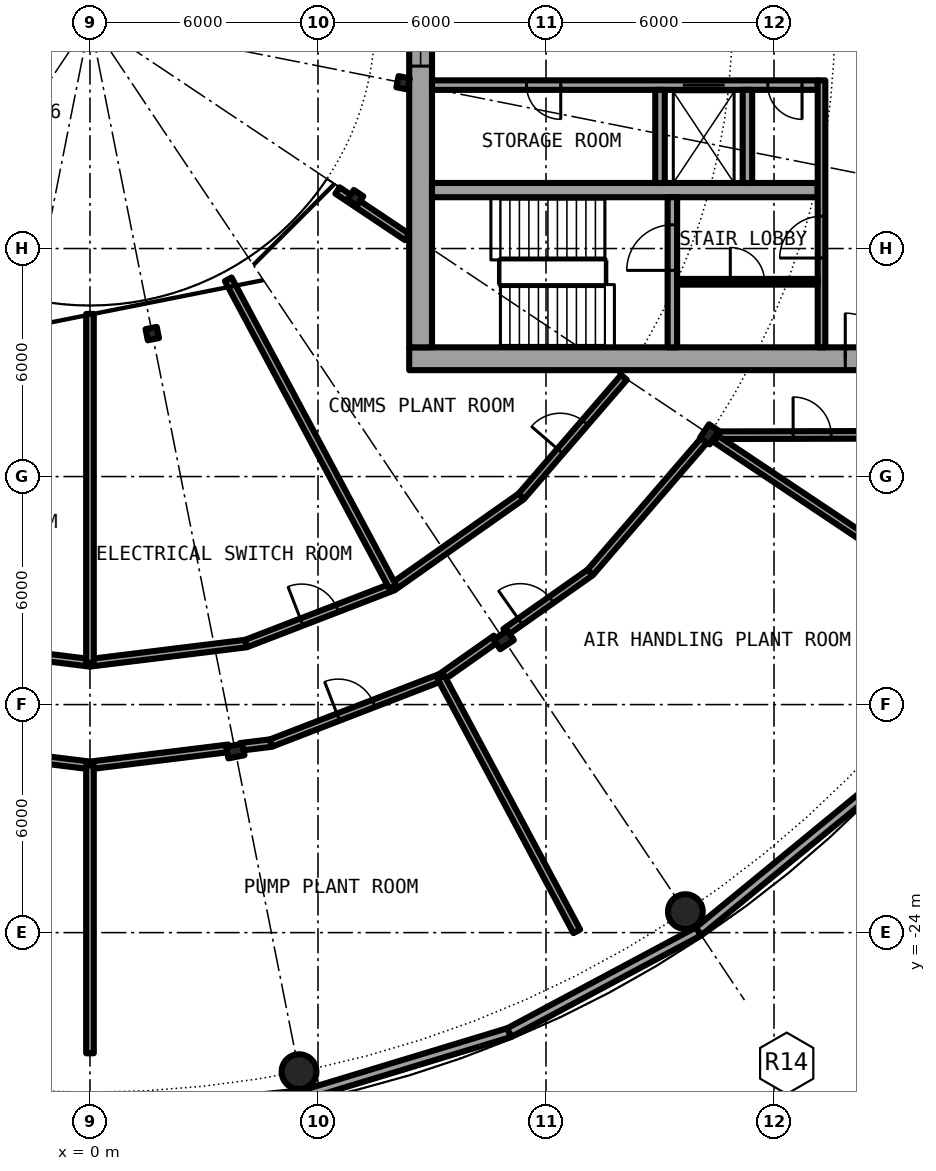
"""IFC4 building model, lengths in metres.
Left out: names, types, materials, properties, quantities, classifications, styles, units other than length and angle.
Written with IfcOpenShell. Run it as: python <this file> out.ifc"""

import sys

from ifc_helpers import new_model, si_unit, direction, frame, frame_2d, origin, origin_2d, place, context, subcontext, project, spatial, rectangle, hollow_circle, i_section, extrude, element, fill, save


model = new_model("IFC4")
c1 = context("Model", 3, precision=1e-05, world=origin(), true_north=direction((0.0, 1.0)))
c2 = subcontext(c1, "Body", "Model", "MODEL_VIEW")
j1 = project(units=[si_unit("LENGTHUNIT", "METRE"), si_unit("PLANEANGLEUNIT", "RADIAN")], contexts=[c1])
p1 = place(None, origin())
s1 = spatial("IfcSite", under=j1, at=p1, CompositionType="ELEMENT")
p2 = place(p1, origin())
s2 = spatial("IfcBuilding", under=s1, at=p2, CompositionType="ELEMENT")
p3 = place(p2, frame((0.0, 0.0, 103.25)))
s3 = spatial("IfcBuildingStorey", under=s2, at=p3, CompositionType="ELEMENT", Elevation=103.25)
for number, where, z_axis, x_axis in (
    (1, (5.501, -27.658, 0.0), (0.0, 0.0, 1.0), (1.0, 0.0, 0.0)),
    (2, (15.667, -23.448, 0.0), (0.0, 0.0, 1.0), (1.0, 0.0, 0.0)),
):
    element("IfcColumn", number, at=place(p3, frame(where, z_axis=z_axis, x_axis=x_axis)), inside=s3, PredefinedType="COLUMN", context=c2, shape_type="SweptSolid", body=[
        extrude(hollow_circle(Radius=0.457, WallThickness=0.04, at=origin_2d()), origin(), (0.0, 0.0, 1.0), 4.2),
    ])
for number, where, z_axis, x_axis in (
    (3, (3.824, -19.223, 0.0), (0.0, 0.0, 1.0), (0.195, -0.981, 0.0)),
    (4, (10.889, -16.297, 0.0), (0.0, 0.0, 1.0), (0.556, -0.831, 0.0)),
    (5, (16.297, -10.889, 0.0), (0.0, 0.0, 1.0), (0.831, -0.556, 0.0)),
):
    element("IfcColumn", number, at=place(p3, frame(where, z_axis=z_axis, x_axis=x_axis)), inside=s3, PredefinedType="COLUMN", context=c2, shape_type="SweptSolid", body=[
        extrude(i_section(OverallWidth=0.307, OverallDepth=0.432, WebThickness=0.021, FlangeThickness=0.04, FilletRadius=0.027, at=origin_2d()), origin(), (0.0, 0.0, 1.0), 4.2),
    ])
for number, where, z_axis, x_axis in (
    (6, (1.639, -8.239, 0.0), (0.0, 0.0, 1.0), (0.195, -0.981, 0.0)),
    (7, (6.984, -4.667, 0.0), (0.0, 0.0, 1.0), (0.831, -0.556, 0.0)),
    (8, (8.239, -1.639, 0.0), (0.0, 0.0, 1.0), (0.981, -0.195, 0.0)),
):
    element("IfcColumn", number, at=place(p3, frame(where, z_axis=z_axis, x_axis=x_axis)), inside=s3, PredefinedType="COLUMN", context=c2, shape_type="SweptSolid", body=[
        extrude(i_section(OverallWidth=0.3, OverallDepth=0.3, WebThickness=0.011, FlangeThickness=0.019, FilletRadius=0.027, at=origin_2d()), origin(), (0.0, 0.0, 1.0), 4.2),
    ])
for number, where, z_axis, x_axis in (
    (9, (-5.623, -28.271, 0.0), (0.0, 0.0, 1.0), (0.995, -0.098, 0.0)),
    (10, (0.0, -28.825, 0.0), (0.0, 0.0, 1.0), (0.995, 0.098, 0.0)),
):
    element("IfcWall", number, at=place(p3, frame(where, z_axis=z_axis, x_axis=x_axis)), inside=s3, PredefinedType="SOLIDWALL", context=c2, shape_type="SweptSolid", body=[
        extrude(rectangle(XDim=5.65, YDim=0.25, at=frame_2d((2.825, 0.0))), origin(), (0.0, 0.0, 1.0), 3.85),
    ])
p4 = place(p3, frame((5.623, -28.271, 0.0), z_axis=(0.0, 0.0, 1.0), x_axis=(0.956969521741, 0.29018844646, 0.0)))
e11 = element("IfcWall", 11, at=p4, inside=s3, PredefinedType="SOLIDWALL", context=c2, shape_type="SweptSolid", body=[
    extrude(rectangle(XDim=5.651, YDim=0.25, at=frame_2d((2.826, 0.0))), origin(), (0.0, 0.0, 1.0), 3.85),
])
p5 = place(p3, frame((11.031, -26.631, 0.0), z_axis=(0.0, 0.0, 1.0), x_axis=(0.881874058161, 0.471485042756, 0.0)))
e12 = element("IfcWall", 12, at=p5, inside=s3, PredefinedType="SOLIDWALL", context=c2, shape_type="SweptSolid", body=[
    extrude(rectangle(XDim=5.65, YDim=0.25, at=frame_2d((2.825, 0.0))), origin(), (0.0, 0.0, 1.0), 3.85),
])
p6 = place(p3, frame((16.014, -23.967, 0.0), z_axis=(0.0, 0.0, 1.0), x_axis=(0.773001659186, 0.634403999748, 0.0)))
e13 = element("IfcWall", 13, at=p6, inside=s3, PredefinedType="SOLIDWALL", context=c2, shape_type="SweptSolid", body=[
    extrude(rectangle(XDim=5.651, YDim=0.25, at=frame_2d((2.825, 0.0))), origin(), (0.0, 0.0, 1.0), 3.85),
])
p7 = place(p3, frame((8.4, -8.9, 0.0), z_axis=(0.0, 0.0, 1.0), x_axis=(1.0, 0.0, 0.0)))
e14 = element("IfcWall", 14, at=p7, inside=s3, PredefinedType="SHEAR", context=c2, shape_type="SweptSolid", body=[
    extrude(rectangle(XDim=13.8, YDim=0.6, at=frame_2d((6.9, 0.0))), origin(), (0.0, 0.0, 1.0), 4.2),
])
p8 = place(p7, frame((11.475, 0.0, 0.0)))
e15 = element("IfcOpeningElement", 15, at=p8, cuts=e14, PredefinedType="OPENING", context=c2, shape_type="SweptSolid", body=[
    extrude(rectangle(XDim=1.2, YDim=2.3, at=frame_2d((0.6, 1.15))), frame((0.0, 0.31, 0.0), z_axis=(0.0, -1.0, 0.0), x_axis=(1.0, 0.0, 0.0)), (0.0, 0.0, 1.0), 0.62),
])
p9 = place(p3, frame((8.7, -8.6, 0.0), z_axis=(0.0, 0.0, 1.0), x_axis=(0.0, 1.0, 0.0)))
e16 = element("IfcWall", 16, at=p9, inside=s3, PredefinedType="SHEAR", context=c2, shape_type="SweptSolid", body=[
    extrude(rectangle(XDim=17.2, YDim=0.6, at=frame_2d((8.6, 0.0))), origin(), (0.0, 0.0, 1.0), 4.2),
])
p10 = place(p9, frame((7.4, 0.0, 0.1)))
e17 = element("IfcOpeningElement", 17, at=p10, cuts=e16, PredefinedType="OPENING", context=c2, shape_type="SweptSolid", body=[
    extrude(rectangle(XDim=2.4, YDim=2.2, at=frame_2d((1.2, 1.1))), frame((0.0, 0.31, 0.0), z_axis=(0.0, -1.0, 0.0), x_axis=(1.0, 0.0, 0.0)), (0.0, 0.0, 1.0), 0.62),
])
p11 = place(p3, frame((19.15, -1.7, 0.0), z_axis=(0.0, 0.0, 1.0), x_axis=(-1.0, 0.0, 0.0)))
e18 = element("IfcWall", 18, at=p11, inside=s3, PredefinedType="SHEAR", context=c2, shape_type="SweptSolid", body=[
    extrude(rectangle(XDim=10.15, YDim=0.25, at=frame_2d((5.075, 0.0))), origin(), (0.0, 0.0, 1.0), 4.2),
])
p12 = place(p11, frame((2.45, 0.0, 0.0)))
e19 = element("IfcOpeningElement", 19, at=p12, cuts=e18, PredefinedType="OPENING", context=c2, shape_type="SweptSolid", body=[
    extrude(rectangle(XDim=1.1, YDim=2.3, at=frame_2d((0.55, 1.15))), frame((0.0, 0.135, 0.0), z_axis=(0.0, -1.0, 0.0), x_axis=(1.0, 0.0, 0.0)), (0.0, 0.0, 1.0), 0.27),
])
p13 = place(p11, frame((6.762, 0.0, 0.0)))
e20 = element("IfcOpeningElement", 20, at=p13, cuts=e18, PredefinedType="OPENING", context=c2, shape_type="SweptSolid", body=[
    extrude(rectangle(XDim=0.9, YDim=2.3, at=frame_2d((0.45, 1.15))), frame((0.0, 0.135, 0.0), z_axis=(0.0, -1.0, 0.0), x_axis=(1.0, 0.0, 0.0)), (0.0, 0.0, 1.0), 0.27),
])
p14 = place(p11, frame((0.413, 0.0, 0.0)))
e21 = element("IfcOpeningElement", 21, at=p14, cuts=e18, PredefinedType="OPENING", context=c2, shape_type="SweptSolid", body=[
    extrude(rectangle(XDim=0.9, YDim=2.3, at=frame_2d((0.45, 1.15))), frame((0.0, 0.135, 0.0), z_axis=(0.0, -1.0, 0.0), x_axis=(1.0, 0.0, 0.0)), (0.0, 0.0, 1.0), 0.27),
])
p15 = place(p3, frame((9.0, -4.462, 0.0), z_axis=(0.0, 0.0, 1.0), x_axis=(1.0, 0.0, 0.0)))
e22 = element("IfcWall", 22, at=p15, inside=s3, PredefinedType="SHEAR", context=c2, shape_type="SweptSolid", body=[
    extrude(rectangle(XDim=10.15, YDim=0.375, at=frame_2d((5.075, 0.0))), origin(), (0.0, 0.0, 1.0), 4.2),
])
p16 = place(p3, frame((15.325, -8.6, 0.0), z_axis=(0.0, 0.0, 1.0), x_axis=(0.0, 1.0, 0.0)))
e23 = element("IfcWall", 23, at=p16, inside=s3, PredefinedType="SHEAR", context=c2, shape_type="SweptSolid", body=[
    extrude(rectangle(XDim=3.95, YDim=0.25, at=frame_2d((1.975, 0.0))), origin(), (0.0, 0.0, 1.0), 4.2),
])
p17 = place(p16, frame((2.025, 0.0, 0.0)))
e24 = element("IfcOpeningElement", 24, at=p17, cuts=e23, PredefinedType="OPENING", context=c2, shape_type="SweptSolid", body=[
    extrude(rectangle(XDim=1.2, YDim=2.3, at=frame_2d((0.6, 1.15))), frame((0.0, 0.135, 0.0), z_axis=(0.0, -1.0, 0.0), x_axis=(1.0, 0.0, 0.0)), (0.0, 0.0, 1.0), 0.27),
])
for number, where, z_axis, x_axis in (
    (25, (15.0, -1.825, 0.0), (0.0, 0.0, 1.0), (0.0, -1.0, 0.0)),
    (26, (17.3, -1.825, 0.0), (0.0, 0.0, 1.0), (0.0, -1.0, 0.0)),
):
    element("IfcWall", number, at=place(p3, frame(where, z_axis=z_axis, x_axis=x_axis)), inside=s3, PredefinedType="SOLIDWALL", context=c2, shape_type="SweptSolid", body=[
        extrude(rectangle(XDim=2.45, YDim=0.25, at=frame_2d((1.225, 0.0))), origin(), (0.0, 0.0, 1.0), 3.85),
    ])
p18 = place(p3, frame((19.25, -8.6, 0.0), z_axis=(0.0, 0.0, 1.0), x_axis=(0.0, 1.0, 0.0)))
e27 = element("IfcWall", 27, at=p18, inside=s3, PredefinedType="SOLIDWALL", context=c2, shape_type="SweptSolid", body=[
    extrude(rectangle(XDim=7.025, YDim=0.2, at=frame_2d((3.513, 0.0))), origin(), (0.0, 0.0, 1.0), 3.85),
])
p19 = place(p18, frame((2.35, 0.0, 0.0)))
e28 = element("IfcOpeningElement", 28, at=p19, cuts=e27, PredefinedType="OPENING", context=c2, shape_type="SweptSolid", body=[
    extrude(rectangle(XDim=1.1, YDim=2.3, at=frame_2d((0.55, 1.15))), frame((0.0, 0.11, 0.0), z_axis=(0.0, -1.0, 0.0), x_axis=(1.0, 0.0, 0.0)), (0.0, 0.0, 1.0), 0.22),
])
p20 = place(p3, frame((15.45, -6.875, 0.0), z_axis=(0.0, 0.0, 1.0), x_axis=(1.0, 0.0, 0.0)))
e29 = element("IfcWall", 29, at=p20, inside=s3, PredefinedType="PARTITIONING", context=c2, shape_type="SweptSolid", body=[
    extrude(rectangle(XDim=3.7, YDim=0.15, at=frame_2d((1.85, 0.0))), origin(), (0.0, 0.0, 1.0), 3.85),
])
p21 = place(p20, frame((1.4, 0.0, 0.0)))
e30 = element("IfcOpeningElement", 30, at=p21, cuts=e29, PredefinedType="OPENING", context=c2, shape_type="SweptSolid", body=[
    extrude(rectangle(XDim=0.9, YDim=2.3, at=frame_2d((0.45, 1.15))), frame((0.0, 0.085, 0.0), z_axis=(0.0, -1.0, 0.0), x_axis=(1.0, 0.0, 0.0)), (0.0, 0.0, 1.0), 0.17),
])
for number, where, z_axis, x_axis in (
    (31, (-3.653, -19.15, 0.0), (0.0, 0.0, 1.0), (0.992, -0.122, 0.0)),
    (32, (0.0, -19.6, 0.0), (0.0, 0.0, 1.0), (0.992, 0.122, 0.0)),
):
    element("IfcWall", number, at=place(p3, frame(where, z_axis=z_axis, x_axis=x_axis)), inside=s3, PredefinedType="PARTITIONING", context=c2, shape_type="SweptSolid", body=[
        extrude(rectangle(XDim=3.681, YDim=0.2, at=frame_2d((1.84, 0.0))), origin(), (0.0, 0.0, 1.0), 3.54),
    ])
p22 = place(p3, frame((3.958, -19.112, 0.0), z_axis=(0.0, 0.0, 1.0), x_axis=(0.99248512894, 0.122365308943, 0.0)))
e33 = element("IfcWall", 33, at=p22, inside=s3, PredefinedType="PARTITIONING", context=c2, shape_type="SweptSolid", body=[
    extrude(rectangle(XDim=0.81, YDim=0.2, at=frame_2d((0.405, 0.0))), origin(), (0.0, 0.0, 1.0), 3.54),
])
p23 = place(p3, frame((4.762, -19.013, 0.0), z_axis=(0.0, 0.0, 1.0), x_axis=(0.932988479706, 0.359906233255, 0.0)))
e34 = element("IfcWall", 34, at=p23, inside=s3, PredefinedType="PARTITIONING", context=c2, shape_type="SweptSolid", body=[
    extrude(rectangle(XDim=4.799, YDim=0.2, at=frame_2d((2.399, 0.0))), origin(), (0.0, 0.0, 1.0), 3.54),
])
p24 = place(p23, frame((1.899, 0.0, 0.0)))
e35 = element("IfcOpeningElement", 35, at=p24, cuts=e34, PredefinedType="OPENING", context=c2, shape_type="SweptSolid", body=[
    extrude(rectangle(XDim=1.0, YDim=2.3, at=frame_2d((0.5, 1.15))), frame((0.0, 0.11, 0.0), z_axis=(0.0, -1.0, 0.0), x_axis=(1.0, 0.0, 0.0)), (0.0, 0.0, 1.0), 0.22),
])
p25 = place(p3, frame((9.239, -17.286, 0.0), z_axis=(0.0, 0.0, 1.0), x_axis=(0.817743843048, 0.575582320052, 0.0)))
e36 = element("IfcWall", 36, at=p25, inside=s3, PredefinedType="PARTITIONING", context=c2, shape_type="SweptSolid", body=[
    extrude(rectangle(XDim=1.768, YDim=0.2, at=frame_2d((0.884, 0.0))), origin(), (0.0, 0.0, 1.0), 3.54),
])
p26 = place(p3, frame((10.936, -16.091, 0.0), z_axis=(0.0, 0.0, 1.0), x_axis=(0.817645456482, 0.575722074872, 0.0)))
e37 = element("IfcWall", 37, at=p26, inside=s3, PredefinedType="PARTITIONING", context=c2, shape_type="SweptSolid", body=[
    extrude(rectangle(XDim=2.724, YDim=0.2, at=frame_2d((1.362, 0.0))), origin(), (0.0, 0.0, 1.0), 3.54),
])
p27 = place(p26, frame((0.474, 0.0, 0.0)))
e38 = element("IfcOpeningElement", 38, at=p27, cuts=e37, PredefinedType="OPENING", context=c2, shape_type="SweptSolid", body=[
    extrude(rectangle(XDim=1.0, YDim=2.3, at=frame_2d((0.5, 1.15))), frame((0.0, 0.11, 0.0), z_axis=(0.0, -1.0, 0.0), x_axis=(1.0, 0.0, 0.0)), (0.0, 0.0, 1.0), 0.22),
])
p28 = place(p3, frame((13.163, -14.523, 0.0), z_axis=(0.0, 0.0, 1.0), x_axis=(0.653087281304, 0.757282644063, 0.0)))
e39 = element("IfcWall", 39, at=p28, inside=s3, PredefinedType="PARTITIONING", context=c2, shape_type="SweptSolid", body=[
    extrude(rectangle(XDim=4.644, YDim=0.2, at=frame_2d((2.322, 0.0))), origin(), (0.0, 0.0, 1.0), 3.54),
])
for number, where, z_axis, x_axis in (
    (40, (-4.106, -16.394, 0.0), (0.0, 0.0, 1.0), (0.992, -0.122, 0.0)),
    (41, (0.0, -16.9, 0.0), (0.0, 0.0, 1.0), (0.992, 0.122, 0.0)),
):
    element("IfcWall", number, at=place(p3, frame(where, z_axis=z_axis, x_axis=x_axis)), inside=s3, PredefinedType="PARTITIONING", context=c2, shape_type="SweptSolid", body=[
        extrude(rectangle(XDim=4.137, YDim=0.2, at=frame_2d((2.068, 0.0))), origin(), (0.0, 0.0, 1.0), 3.85),
    ])
p29 = place(p3, frame((4.106, -16.394, 0.0), z_axis=(0.0, 0.0, 1.0), x_axis=(0.932943640288, 0.360022449363, 0.0)))
e42 = element("IfcWall", 42, at=p29, inside=s3, PredefinedType="PARTITIONING", context=c2, shape_type="SweptSolid", body=[
    extrude(rectangle(XDim=4.139, YDim=0.2, at=frame_2d((2.069, 0.0))), origin(), (0.0, 0.0, 1.0), 3.85),
])
p30 = place(p29, frame((1.569, 0.0, 0.0)))
e43 = element("IfcOpeningElement", 43, at=p30, cuts=e42, PredefinedType="OPENING", context=c2, shape_type="SweptSolid", body=[
    extrude(rectangle(XDim=1.0, YDim=2.3, at=frame_2d((0.5, 1.15))), frame((0.0, 0.11, 0.0), z_axis=(0.0, -1.0, 0.0), x_axis=(1.0, 0.0, 0.0)), (0.0, 0.0, 1.0), 0.22),
])
p31 = place(p3, frame((7.967, -14.904, 0.0), z_axis=(0.0, 0.0, 1.0), x_axis=(0.817567680547, 0.575832517079, 0.0)))
e44 = element("IfcWall", 44, at=p31, inside=s3, PredefinedType="PARTITIONING", context=c2, shape_type="SweptSolid", body=[
    extrude(rectangle(XDim=4.137, YDim=0.2, at=frame_2d((2.068, 0.0))), origin(), (0.0, 0.0, 1.0), 3.85),
])
p32 = place(p3, frame((11.349, -12.522, 0.0), z_axis=(0.0, 0.0, 1.0), x_axis=(0.653212695939, 0.757174467256, 0.0)))
e45 = element("IfcWall", 45, at=p32, inside=s3, PredefinedType="PARTITIONING", context=c2, shape_type="SweptSolid", body=[
    extrude(rectangle(XDim=4.138, YDim=0.2, at=frame_2d((2.069, 0.0))), origin(), (0.0, 0.0, 1.0), 3.85),
])
p33 = place(p32, frame((1.569, 0.0, 0.0)))
e46 = element("IfcOpeningElement", 46, at=p33, cuts=e45, PredefinedType="OPENING", context=c2, shape_type="SweptSolid", body=[
    extrude(rectangle(XDim=1.0, YDim=2.3, at=frame_2d((0.5, 1.15))), frame((0.0, 0.11, 0.0), z_axis=(0.0, -1.0, 0.0), x_axis=(1.0, 0.0, 0.0)), (0.0, 0.0, 1.0), 0.22),
])
p34 = place(p3, frame((16.541, -10.912, 0.0), z_axis=(0.0, 0.0, 1.0), x_axis=(0.999997173357, 0.002377662213, 0.0)))
e47 = element("IfcWall", 47, at=p34, inside=s3, PredefinedType="PARTITIONING", context=c2, shape_type="SweptSolid", body=[
    extrude(rectangle(XDim=5.134, YDim=0.2, at=frame_2d((2.567, 0.0))), origin(), (0.0, 0.0, 1.0), 3.85),
])
p35 = place(p34, frame((1.963, 0.0, 0.0)))
e48 = element("IfcOpeningElement", 48, at=p35, cuts=e47, PredefinedType="OPENING", context=c2, shape_type="SweptSolid", body=[
    extrude(rectangle(XDim=1.0, YDim=2.3, at=frame_2d((0.5, 1.15))), frame((0.0, 0.11, 0.0), z_axis=(0.0, -1.0, 0.0), x_axis=(1.0, 0.0, 0.0)), (0.0, 0.0, 1.0), 0.22),
])
p36 = place(p3, frame((6.513, -4.472, 0.0), z_axis=(0.0, 0.0, 1.0), x_axis=(0.831333375071, -0.555774072347, 0.0)))
e49 = element("IfcWall", 49, at=p36, inside=s3, PredefinedType="PARTITIONING", context=c2, shape_type="SweptSolid", body=[
    extrude(rectangle(XDim=2.203, YDim=0.2, at=frame_2d((1.101, 0.0))), origin(), (0.0, 0.0, 1.0), 3.85),
])
p37 = place(p3, frame((0.0, -27.175, 0.0), z_axis=(0.0, 0.0, 1.0), x_axis=(0.0, 1.0, 0.0)))
e50 = element("IfcWall", 50, at=p37, inside=s3, PredefinedType="PARTITIONING", context=c2, shape_type="SweptSolid", body=[
    extrude(rectangle(XDim=7.575, YDim=0.2, at=frame_2d((3.788, 0.0))), origin(), (0.0, 0.0, 1.0), 3.85),
])
p38 = place(p3, frame((0.0, -16.9, 0.0), z_axis=(0.0, 0.0, 1.0), x_axis=(0.0, 1.0, 0.0)))
e51 = element("IfcWall", 51, at=p38, inside=s3, PredefinedType="PARTITIONING", context=c2, shape_type="SweptSolid", body=[
    extrude(rectangle(XDim=9.18, YDim=0.2, at=frame_2d((4.59, 0.0))), origin(), (0.0, 0.0, 1.0), 3.85),
])
p39 = place(p3, frame((3.638, -6.809, 0.0), z_axis=(0.0, 0.0, 1.0), x_axis=(0.471460365694, -0.881887251059, 0.0)))
e52 = element("IfcWall", 52, at=p39, inside=s3, PredefinedType="PARTITIONING", context=c2, shape_type="SweptSolid", body=[
    extrude(rectangle(XDim=9.18, YDim=0.2, at=frame_2d((4.59, 0.0))), origin(), (0.0, 0.0, 1.0), 3.85),
])
p40 = place(p3, frame((9.239, -17.286, 0.0), z_axis=(0.0, 0.0, 1.0), x_axis=(0.471439510802, -0.881898399848, 0.0)))
e53 = element("IfcWall", 53, at=p40, inside=s3, PredefinedType="PARTITIONING", context=c2, shape_type="SweptSolid", body=[
    extrude(rectangle(XDim=7.575, YDim=0.2, at=frame_2d((3.787, 0.0))), origin(), (0.0, 0.0, 1.0), 3.85),
])
p41 = place(p3, frame((16.474, -11.012, 0.0), z_axis=(0.0, 0.0, 1.0), x_axis=(0.83143223768, -0.555626164023, 0.0)))
e54 = element("IfcWall", 54, at=p41, inside=s3, PredefinedType="PARTITIONING", context=c2, shape_type="SweptSolid", body=[
    extrude(rectangle(XDim=7.359, YDim=0.2, at=frame_2d((3.68, 0.0))), origin(), (0.0, 0.0, 1.0), 3.85),
])
p42 = place(p12, origin())
e55 = element("IfcDoor", 55, at=p42, inside=s3, OperationType="DOUBLE_DOOR_SLIDING", PredefinedType="DOOR", context=c2, shape_type="SweptSolid", body=[
    extrude(rectangle(XDim=1.1, YDim=2.3, at=frame_2d((0.55, 1.15))), frame((0.0, 0.025, 0.0), z_axis=(0.0, -1.0, 0.0), x_axis=(1.0, 0.0, 0.0)), (0.0, 0.0, 1.0), 0.05),
])
fill(e19, e55)
p43 = place(p13, origin())
e56 = element("IfcDoor", 56, at=p43, inside=s3, OperationType="SINGLE_SWING_LEFT", PredefinedType="DOOR", context=c2, shape_type="SweptSolid", body=[
    extrude(rectangle(XDim=0.9, YDim=2.3, at=frame_2d((0.45, 1.15))), frame((0.0, 0.025, 0.0), z_axis=(0.0, -1.0, 0.0), x_axis=(1.0, 0.0, 0.0)), (0.0, 0.0, 1.0), 0.05),
])
fill(e20, e56)
p44 = place(p14, origin())
e57 = element("IfcDoor", 57, at=p44, inside=s3, OperationType="SINGLE_SWING_RIGHT", PredefinedType="DOOR", context=c2, shape_type="SweptSolid", body=[
    extrude(rectangle(XDim=0.9, YDim=2.3, at=frame_2d((0.45, 1.15))), frame((0.0, 0.025, 0.0), z_axis=(0.0, -1.0, 0.0), x_axis=(1.0, 0.0, 0.0)), (0.0, 0.0, 1.0), 0.05),
])
fill(e21, e57)
p45 = place(p21, origin())
e58 = element("IfcDoor", 58, at=p45, inside=s3, OperationType="SINGLE_SWING_LEFT", PredefinedType="DOOR", context=c2, shape_type="SweptSolid", body=[
    extrude(rectangle(XDim=0.9, YDim=2.3, at=frame_2d((0.45, 1.15))), frame((0.0, 0.025, 0.0), z_axis=(0.0, -1.0, 0.0), x_axis=(1.0, 0.0, 0.0)), (0.0, 0.0, 1.0), 0.05),
])
fill(e30, e58)
p46 = place(p17, origin())
e59 = element("IfcDoor", 59, at=p46, inside=s3, OperationType="SINGLE_SWING_LEFT", PredefinedType="DOOR", context=c2, shape_type="SweptSolid", body=[
    extrude(rectangle(XDim=1.2, YDim=2.3, at=frame_2d((0.6, 1.15))), frame((0.0, 0.025, 0.0), z_axis=(0.0, -1.0, 0.0), x_axis=(1.0, 0.0, 0.0)), (0.0, 0.0, 1.0), 0.05),
])
fill(e24, e59)
p47 = place(p19, origin())
e60 = element("IfcDoor", 60, at=p47, inside=s3, OperationType="SINGLE_SWING_RIGHT", PredefinedType="DOOR", context=c2, shape_type="SweptSolid", body=[
    extrude(rectangle(XDim=1.1, YDim=2.3, at=frame_2d((0.55, 1.15))), frame((0.0, 0.025, 0.0), z_axis=(0.0, -1.0, 0.0), x_axis=(1.0, 0.0, 0.0)), (0.0, 0.0, 1.0), 0.05),
])
fill(e28, e60)
p48 = place(p8, origin())
e61 = element("IfcDoor", 61, at=p48, inside=s3, OperationType="SINGLE_SWING_LEFT", PredefinedType="DOOR", context=c2, shape_type="SweptSolid", body=[
    extrude(rectangle(XDim=1.2, YDim=2.3, at=frame_2d((0.6, 1.15))), frame((0.0, 0.025, 0.0), z_axis=(0.0, -1.0, 0.0), x_axis=(1.0, 0.0, 0.0)), (0.0, 0.0, 1.0), 0.05),
])
fill(e15, e61)
p49 = place(p10, origin())
e62 = element("IfcWindow", 62, at=p49, inside=s3, PartitioningType="SINGLE_PANEL", PredefinedType="WINDOW", context=c2, shape_type="SweptSolid", body=[
    extrude(rectangle(XDim=2.4, YDim=2.2, at=frame_2d((1.2, 1.1))), frame((0.0, 0.03, 0.0), z_axis=(0.0, -1.0, 0.0), x_axis=(1.0, 0.0, 0.0)), (0.0, 0.0, 1.0), 0.06),
])
fill(e17, e62)
p50 = place(p24, origin())
e63 = element("IfcDoor", 63, at=p50, inside=s3, OperationType="SINGLE_SWING_LEFT", PredefinedType="DOOR", context=c2, shape_type="SweptSolid", body=[
    extrude(rectangle(XDim=1.0, YDim=2.3, at=frame_2d((0.5, 1.15))), frame((0.0, 0.025, 0.0), z_axis=(0.0, -1.0, 0.0), x_axis=(1.0, 0.0, 0.0)), (0.0, 0.0, 1.0), 0.05),
])
fill(e35, e63)
p51 = place(p27, origin())
e64 = element("IfcDoor", 64, at=p51, inside=s3, OperationType="SINGLE_SWING_LEFT", PredefinedType="DOOR", context=c2, shape_type="SweptSolid", body=[
    extrude(rectangle(XDim=1.0, YDim=2.3, at=frame_2d((0.5, 1.15))), frame((0.0, 0.025, 0.0), z_axis=(0.0, -1.0, 0.0), x_axis=(1.0, 0.0, 0.0)), (0.0, 0.0, 1.0), 0.05),
])
fill(e38, e64)
p52 = place(p30, origin())
e65 = element("IfcDoor", 65, at=p52, inside=s3, OperationType="SINGLE_SWING_RIGHT", PredefinedType="DOOR", context=c2, shape_type="SweptSolid", body=[
    extrude(rectangle(XDim=1.0, YDim=2.3, at=frame_2d((0.5, 1.15))), frame((0.0, 0.025, 0.0), z_axis=(0.0, -1.0, 0.0), x_axis=(1.0, 0.0, 0.0)), (0.0, 0.0, 1.0), 0.05),
])
fill(e43, e65)
p53 = place(p33, origin())
e66 = element("IfcDoor", 66, at=p53, inside=s3, OperationType="SINGLE_SWING_RIGHT", PredefinedType="DOOR", context=c2, shape_type="SweptSolid", body=[
    extrude(rectangle(XDim=1.0, YDim=2.3, at=frame_2d((0.5, 1.15))), frame((0.0, 0.025, 0.0), z_axis=(0.0, -1.0, 0.0), x_axis=(1.0, 0.0, 0.0)), (0.0, 0.0, 1.0), 0.05),
])
fill(e46, e66)
p54 = place(p35, origin())
e67 = element("IfcDoor", 67, at=p54, inside=s3, OperationType="SINGLE_SWING_LEFT", PredefinedType="DOOR", context=c2, shape_type="SweptSolid", body=[
    extrude(rectangle(XDim=1.0, YDim=2.3, at=frame_2d((0.5, 1.15))), frame((0.0, 0.025, 0.0), z_axis=(0.0, -1.0, 0.0), x_axis=(1.0, 0.0, 0.0)), (0.0, 0.0, 1.0), 0.05),
])
fill(e48, e67)
save(model, sys.argv[1])
